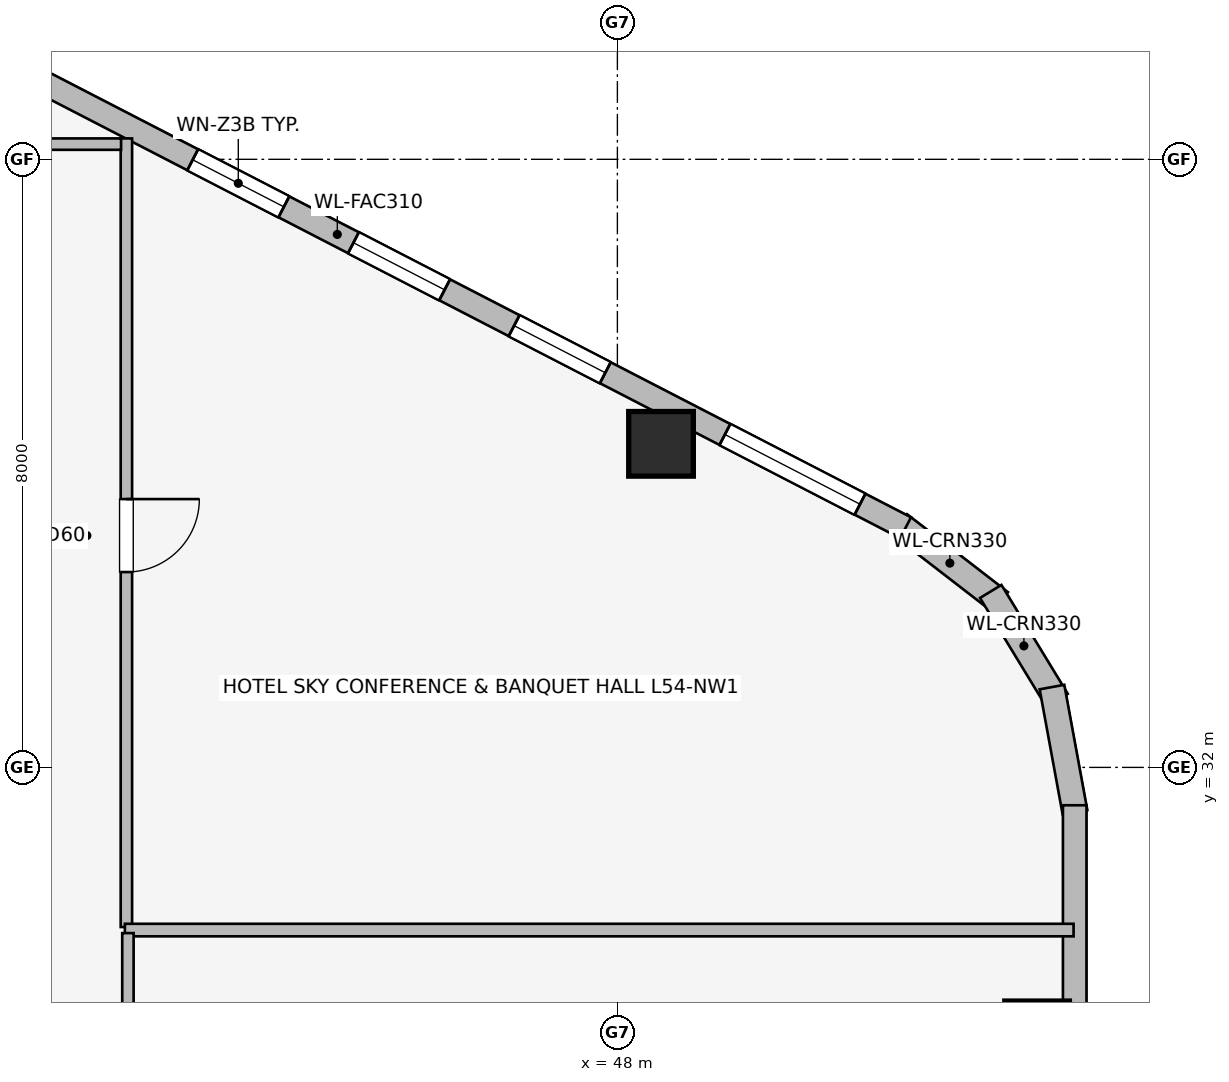
"""IFC4 building model, lengths in metres.
Left out: names, types, materials, properties, quantities, classifications, styles, units other than length and angle.
Written with IfcOpenShell. Run it as: python <this file> out.ifc"""

import sys

from ifc_helpers import new_model, si_unit, direction, frame, frame_2d, origin, origin_2d, place, context, subcontext, project, spatial, rectangle, extrude, element, fill, save


model = new_model("IFC4")
c1 = context("Model", 3, precision=1e-05, world=origin(), true_north=direction((0.0, 1.0)))
c2 = subcontext(c1, "Body", "Model", "MODEL_VIEW")
j1 = project(units=[si_unit("LENGTHUNIT", "METRE"), si_unit("PLANEANGLEUNIT", "RADIAN")], contexts=[c1])
p1 = place(None, origin())
s1 = spatial("IfcSite", under=j1, at=p1, CompositionType="ELEMENT")
p2 = place(p1, origin())
s2 = spatial("IfcBuilding", under=s1, at=p2, CompositionType="ELEMENT")
p3 = place(p2, frame((0.0, 0.0, 199.9)))
s3 = spatial("IfcBuildingStorey", under=s2, at=p3, CompositionType="ELEMENT", Elevation=199.9)
for number, where, z_axis, x_axis in (
    (1, (48.574, 36.257, 0.0), (0.0, 0.0, 1.0), (1.0, 0.0, 0.0)),
    (2, (53.522, 28.501, 0.0), (0.0, 0.0, 1.0), (1.0, 0.0, 0.0)),
):
    element("IfcColumn", number, at=place(p3, frame(where, z_axis=z_axis, x_axis=x_axis)), inside=s3, PredefinedType="COLUMN", context=c2, shape_type="SweptSolid", body=[
        extrude(rectangle(XDim=0.85, YDim=0.85, at=origin_2d()), origin(), (0.0, 0.0, 1.0), 3.45),
    ])
p4 = place(p3, frame((51.711, 35.2, 0.0), z_axis=(0.0, 0.0, 1.0), x_axis=(0.791464279355, -0.611215423976, 0.0)))
e3 = element("IfcWall", 3, at=p4, inside=s3, PredefinedType="STANDARD", context=c2, shape_type="SweptSolid", body=[
    extrude(rectangle(XDim=1.677, YDim=0.33, at=frame_2d((0.838, 0.0))), origin(), (0.0, 0.0, 1.0), 3.19),
])
p5 = place(p3, frame((52.912, 34.315, 0.0), z_axis=(0.0, 0.0, 1.0), x_axis=(0.520219286058, -0.85403272444, 0.0)))
e4 = element("IfcWall", 4, at=p5, inside=s3, PredefinedType="STANDARD", context=c2, shape_type="SweptSolid", body=[
    extrude(rectangle(XDim=1.678, YDim=0.33, at=frame_2d((0.839, 0.0))), origin(), (0.0, 0.0, 1.0), 3.19),
])
p6 = place(p3, frame((53.718, 33.057, 0.0), z_axis=(0.0, 0.0, 1.0), x_axis=(0.180717642671, -0.983535019014, 0.0)))
e5 = element("IfcWall", 5, at=p6, inside=s3, PredefinedType="STANDARD", context=c2, shape_type="SweptSolid", body=[
    extrude(rectangle(XDim=1.677, YDim=0.33, at=frame_2d((0.838, 0.0))), origin(), (0.0, 0.0, 1.0), 3.19),
])
p7 = place(p3, frame((36.838, 42.871, 0.0), z_axis=(0.0, 0.0, 1.0), x_axis=(0.888626188278, -0.458632202867, 0.0)))
e6 = element("IfcWall", 6, at=p7, inside=s3, PredefinedType="STANDARD", context=c2, shape_type="SweptSolid", body=[
    extrude(rectangle(XDim=16.828, YDim=0.31, at=frame_2d((8.414, 0.0))), origin(), (0.0, 0.0, 1.0), 3.19),
])
p8 = place(p7, frame((0.675, 0.0, 0.75)))
e7 = element("IfcOpeningElement", 7, at=p8, cuts=e6, PredefinedType="OPENING", context=c2, shape_type="SweptSolid", body=[
    extrude(rectangle(XDim=2.0, YDim=1.5, at=frame_2d((1.0, 0.75))), frame((0.0, 0.165, 0.0), z_axis=(0.0, -1.0, 0.0), x_axis=(1.0, 0.0, 0.0)), (0.0, 0.0, 1.0), 0.33),
])
p9 = place(p7, frame((6.273, 0.0, 0.75)))
e8 = element("IfcOpeningElement", 8, at=p9, cuts=e6, PredefinedType="OPENING", context=c2, shape_type="SweptSolid", body=[
    extrude(rectangle(XDim=1.35, YDim=1.45, at=frame_2d((0.675, 0.725))), frame((0.0, 0.165, 0.0), z_axis=(0.0, -1.0, 0.0), x_axis=(1.0, 0.0, 0.0)), (0.0, 0.0, 1.0), 0.33),
])
p10 = place(p7, frame((8.653, 0.0, 0.75)))
e9 = element("IfcOpeningElement", 9, at=p10, cuts=e6, PredefinedType="OPENING", context=c2, shape_type="SweptSolid", body=[
    extrude(rectangle(XDim=1.35, YDim=1.45, at=frame_2d((0.675, 0.725))), frame((0.0, 0.165, 0.0), z_axis=(0.0, -1.0, 0.0), x_axis=(1.0, 0.0, 0.0)), (0.0, 0.0, 1.0), 0.33),
])
p11 = place(p7, frame((11.032, 0.0, 0.75)))
e10 = element("IfcOpeningElement", 10, at=p11, cuts=e6, PredefinedType="OPENING", context=c2, shape_type="SweptSolid", body=[
    extrude(rectangle(XDim=1.35, YDim=1.45, at=frame_2d((0.675, 0.725))), frame((0.0, 0.165, 0.0), z_axis=(0.0, -1.0, 0.0), x_axis=(1.0, 0.0, 0.0)), (0.0, 0.0, 1.0), 0.33),
])
p12 = place(p7, frame((14.153, 0.0, 0.75)))
e11 = element("IfcOpeningElement", 11, at=p12, cuts=e6, PredefinedType="OPENING", context=c2, shape_type="SweptSolid", body=[
    extrude(rectangle(XDim=2.0, YDim=1.5, at=frame_2d((1.0, 0.75))), frame((0.0, 0.165, 0.0), z_axis=(0.0, -1.0, 0.0), x_axis=(1.0, 0.0, 0.0)), (0.0, 0.0, 1.0), 0.33),
])
p13 = place(p3, frame((54.017, 31.502, 0.0), z_axis=(0.0, 0.0, 1.0), x_axis=(0.0, -1.0, 0.0)))
e12 = element("IfcWall", 12, at=p13, inside=s3, PredefinedType="STANDARD", context=c2, shape_type="SweptSolid", body=[
    extrude(rectangle(XDim=15.004, YDim=0.31, at=frame_2d((7.502, 0.0))), origin(), (0.0, 0.0, 1.0), 3.19),
])
p14 = place(p13, frame((3.722, 0.0, 0.75)))
e13 = element("IfcOpeningElement", 13, at=p14, cuts=e12, PredefinedType="OPENING", context=c2, shape_type="SweptSolid", body=[
    extrude(rectangle(XDim=1.05, YDim=1.4, at=frame_2d((0.525, 0.7))), frame((0.0, 0.165, 0.0), z_axis=(0.0, -1.0, 0.0), x_axis=(1.0, 0.0, 0.0)), (0.0, 0.0, 1.0), 0.33),
])
p15 = place(p13, frame((6.419, 0.0, 0.75)))
e14 = element("IfcOpeningElement", 14, at=p15, cuts=e12, PredefinedType="OPENING", context=c2, shape_type="SweptSolid", body=[
    extrude(rectangle(XDim=1.35, YDim=1.45, at=frame_2d((0.675, 0.725))), frame((0.0, 0.165, 0.0), z_axis=(0.0, -1.0, 0.0), x_axis=(1.0, 0.0, 0.0)), (0.0, 0.0, 1.0), 0.33),
])
p16 = place(p13, frame((9.825, 0.0, 0.75)))
e15 = element("IfcOpeningElement", 15, at=p16, cuts=e12, PredefinedType="OPENING", context=c2, shape_type="SweptSolid", body=[
    extrude(rectangle(XDim=1.05, YDim=1.4, at=frame_2d((0.525, 0.7))), frame((0.0, 0.165, 0.0), z_axis=(0.0, -1.0, 0.0), x_axis=(1.0, 0.0, 0.0)), (0.0, 0.0, 1.0), 0.33),
])
p17 = place(p3, frame((41.54, 40.275, 0.0), z_axis=(0.0, 0.0, 1.0), x_axis=(0.0, -1.0, 0.0)))
e16 = element("IfcWall", 16, at=p17, inside=s3, PredefinedType="PARTITIONING", context=c2, shape_type="SweptSolid", body=[
    extrude(rectangle(XDim=10.375, YDim=0.15, at=frame_2d((5.188, 0.0))), origin(), (0.0, 0.0, 1.0), 3.19),
])
p18 = place(p17, frame((4.745, 0.0, 0.0)))
e17 = element("IfcOpeningElement", 17, at=p18, cuts=e16, PredefinedType="OPENING", context=c2, shape_type="SweptSolid", body=[
    extrude(rectangle(XDim=0.96, YDim=2.0, at=frame_2d((0.48, 1.0))), frame((0.0, 0.085, 0.0), z_axis=(0.0, -1.0, 0.0), x_axis=(1.0, 0.0, 0.0)), (0.0, 0.0, 1.0), 0.17),
])
p19 = place(p3, frame((41.52, 29.86, 0.0), z_axis=(0.0, 0.0, 1.0), x_axis=(1.0, 0.0, 0.0)))
e18 = element("IfcWall", 18, at=p19, inside=s3, PredefinedType="PARTITIONING", context=c2, shape_type="SweptSolid", body=[
    extrude(rectangle(XDim=12.482, YDim=0.165, at=frame_2d((6.241, 0.0))), origin(), (0.0, 0.0, 1.0), 3.19),
])
p20 = place(p3, frame((41.56, 26.23, 0.0), z_axis=(0.0, 0.0, 1.0), x_axis=(0.0, 1.0, 0.0)))
e19 = element("IfcWall", 19, at=p20, inside=s3, PredefinedType="PARTITIONING", context=c2, shape_type="SweptSolid", body=[
    extrude(rectangle(XDim=3.59, YDim=0.15, at=frame_2d((1.795, 0.0))), origin(), (0.0, 0.0, 1.0), 3.19),
])
p21 = place(p20, frame((1.315, 0.0, 0.0)))
e20 = element("IfcOpeningElement", 20, at=p21, cuts=e19, PredefinedType="OPENING", context=c2, shape_type="SweptSolid", body=[
    extrude(rectangle(XDim=0.96, YDim=2.0, at=frame_2d((0.48, 1.0))), frame((0.0, 0.085, 0.0), z_axis=(0.0, -1.0, 0.0), x_axis=(1.0, 0.0, 0.0)), (0.0, 0.0, 1.0), 0.17),
])
p22 = place(p3, frame((39.958, 40.2, 0.0), z_axis=(0.0, 0.0, 1.0), x_axis=(1.0, 0.0, 0.0)))
e21 = element("IfcWall", 21, at=p22, inside=s3, PredefinedType="PARTITIONING", context=c2, shape_type="SweptSolid", body=[
    extrude(rectangle(XDim=1.512, YDim=0.15, at=frame_2d((0.756, 0.0))), origin(), (0.0, 0.0, 1.0), 3.19),
])
p23 = place(p9, origin())
e22 = element("IfcWindow", 22, at=p23, inside=s3, PartitioningType="SINGLE_PANEL", PredefinedType="WINDOW", context=c2, shape_type="SweptSolid", body=[
    extrude(rectangle(XDim=1.35, YDim=1.45, at=frame_2d((0.675, 0.725))), frame((0.0, 0.03, 0.0), z_axis=(0.0, -1.0, 0.0), x_axis=(1.0, 0.0, 0.0)), (0.0, 0.0, 1.0), 0.06),
])
fill(e8, e22)
p24 = place(p10, origin())
e23 = element("IfcWindow", 23, at=p24, inside=s3, PartitioningType="SINGLE_PANEL", PredefinedType="WINDOW", context=c2, shape_type="SweptSolid", body=[
    extrude(rectangle(XDim=1.35, YDim=1.45, at=frame_2d((0.675, 0.725))), frame((0.0, 0.03, 0.0), z_axis=(0.0, -1.0, 0.0), x_axis=(1.0, 0.0, 0.0)), (0.0, 0.0, 1.0), 0.06),
])
fill(e9, e23)
p25 = place(p11, origin())
e24 = element("IfcWindow", 24, at=p25, inside=s3, PartitioningType="SINGLE_PANEL", PredefinedType="WINDOW", context=c2, shape_type="SweptSolid", body=[
    extrude(rectangle(XDim=1.35, YDim=1.45, at=frame_2d((0.675, 0.725))), frame((0.0, 0.03, 0.0), z_axis=(0.0, -1.0, 0.0), x_axis=(1.0, 0.0, 0.0)), (0.0, 0.0, 1.0), 0.06),
])
fill(e10, e24)
p26 = place(p12, origin())
e25 = element("IfcWindow", 25, at=p26, inside=s3, PartitioningType="SINGLE_PANEL", PredefinedType="WINDOW", context=c2, shape_type="SweptSolid", body=[
    extrude(rectangle(XDim=2.0, YDim=1.5, at=frame_2d((1.0, 0.75))), frame((0.0, 0.03, 0.0), z_axis=(0.0, -1.0, 0.0), x_axis=(1.0, 0.0, 0.0)), (0.0, 0.0, 1.0), 0.06),
])
fill(e11, e25)
p27 = place(p18, origin())
e26 = element("IfcDoor", 26, at=p27, inside=s3, OperationType="SINGLE_SWING_LEFT", PredefinedType="DOOR", context=c2, shape_type="SweptSolid", body=[
    extrude(rectangle(XDim=0.96, YDim=2.0, at=frame_2d((0.48, 1.0))), frame((0.0, 0.025, 0.0), z_axis=(0.0, -1.0, 0.0), x_axis=(1.0, 0.0, 0.0)), (0.0, 0.0, 1.0), 0.05),
])
fill(e17, e26)
save(model, sys.argv[1])
